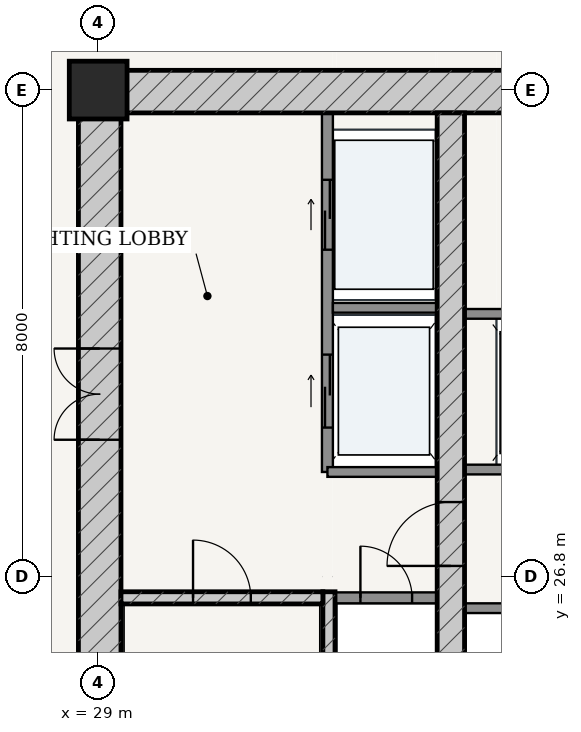
"""IFC4 building model, lengths in metres.
Left out: names, types, materials, properties, quantities, classifications, styles, units other than length and angle.
Written with IfcOpenShell. Run it as: python <this file> out.ifc"""

import sys

from ifc_helpers import new_model, si_unit, direction, frame, frame_2d, origin, origin_2d, place, context, subcontext, project, spatial, rectangle, extrude, source, transform, mapped, element, fill, save


model = new_model("IFC4")
c1 = context("Model", 3, precision=1e-05, world=origin(), true_north=direction((-0.2419218956, 0.970295726276)))
c2 = subcontext(c1, "Body", "Model", "MODEL_VIEW")
j1 = project(units=[si_unit("LENGTHUNIT", "METRE"), si_unit("PLANEANGLEUNIT", "RADIAN")], contexts=[c1])
p1 = place(None, origin())
s1 = spatial("IfcSite", under=j1, at=p1, CompositionType="ELEMENT")
p2 = place(p1, origin())
s2 = spatial("IfcBuilding", under=s1, at=p2, CompositionType="ELEMENT")
p3 = place(p2, frame((0.0, 0.0, 108.6)))
s3 = spatial("IfcBuildingStorey", under=s2, at=p3, CompositionType="ELEMENT", Elevation=108.6)
p4 = place(p3, frame((29.0, 34.8, 0.0), z_axis=(0.0, 0.0, 1.0), x_axis=(1.0, 0.0, 0.0)))
e1 = element("IfcColumn", 1, at=p4, inside=s3, PredefinedType="COLUMN", context=c2, shape_type="SweptSolid", body=[
    extrude(rectangle(XDim=0.95, YDim=0.95, at=origin_2d()), origin(), (0.0, 0.0, 1.0), 3.6),
])
p5 = place(p3, frame((28.675, 34.775, 0.0), z_axis=(0.0, 0.0, 1.0), x_axis=(1.0, 0.0, 0.0)))
e2 = element("IfcWall", 2, at=p5, inside=s3, PredefinedType="SHEAR", context=c2, shape_type="SweptSolid", body=[
    extrude(rectangle(XDim=18.65, YDim=0.7, at=frame_2d((9.325, 0.0))), origin(), (0.0, 0.0, 1.0), 3.325),
])
p6 = place(p5, frame((7.357, 0.0, 0.0)))
e3 = element("IfcOpeningElement", 3, at=p6, cuts=e2, PredefinedType="OPENING", context=c2, shape_type="SweptSolid", body=[
    extrude(rectangle(XDim=0.86, YDim=2.1, at=frame_2d((0.43, 1.05))), frame((0.0, 0.36, 0.0), z_axis=(0.0, -1.0, 0.0), x_axis=(1.0, 0.0, 0.0)), (0.0, 0.0, 1.0), 0.72),
])
p7 = place(p5, frame((10.438, 0.0, 0.0)))
e4 = element("IfcOpeningElement", 4, at=p7, cuts=e2, PredefinedType="OPENING", context=c2, shape_type="SweptSolid", body=[
    extrude(rectangle(XDim=0.85, YDim=2.1, at=frame_2d((0.425, 1.05))), frame((0.0, 0.36, 0.0), z_axis=(0.0, -1.0, 0.0), x_axis=(1.0, 0.0, 0.0)), (0.0, 0.0, 1.0), 0.72),
])
p8 = place(p3, frame((29.025, 19.175, 0.0), z_axis=(0.0, 0.0, 1.0), x_axis=(0.0, 1.0, 0.0)))
e5 = element("IfcWall", 5, at=p8, inside=s3, PredefinedType="SHEAR", context=c2, shape_type="SweptSolid", body=[
    extrude(rectangle(XDim=15.25, YDim=0.7, at=frame_2d((7.625, 0.0))), origin(), (0.0, 0.0, 1.0), 3.325),
])
p9 = place(p8, frame((9.875, 0.0, 0.0)))
e6 = element("IfcOpeningElement", 6, at=p9, cuts=e5, PredefinedType="OPENING", context=c2, shape_type="SweptSolid", body=[
    extrude(rectangle(XDim=1.5, YDim=2.2, at=frame_2d((0.75, 1.1))), frame((0.0, 0.36, 0.0), z_axis=(0.0, -1.0, 0.0), x_axis=(1.0, 0.0, 0.0)), (0.0, 0.0, 1.0), 0.72),
])
p10 = place(p3, frame((32.795, 19.175, 0.0), z_axis=(0.0, 0.0, 1.0), x_axis=(0.0, 1.0, 0.0)))
e7 = element("IfcWall", 7, at=p10, inside=s3, PredefinedType="SOLIDWALL", context=c2, shape_type="SweptSolid", body=[
    extrude(rectangle(XDim=7.375, YDim=0.2, at=frame_2d((3.688, 0.0))), origin(), (0.0, 0.0, 1.0), 3.325),
])
p11 = place(p3, frame((29.375, 26.45, 0.0), z_axis=(0.0, 0.0, 1.0), x_axis=(1.0, 0.0, 0.0)))
e8 = element("IfcWall", 8, at=p11, inside=s3, PredefinedType="SOLIDWALL", context=c2, shape_type="SweptSolid", body=[
    extrude(rectangle(XDim=3.32, YDim=0.2, at=frame_2d((1.66, 0.0))), origin(), (0.0, 0.0, 1.0), 3.325),
])
p12 = place(p11, frame((1.185, 0.0, 0.0)))
e9 = element("IfcOpeningElement", 9, at=p12, cuts=e8, PredefinedType="OPENING", context=c2, shape_type="SweptSolid", body=[
    extrude(rectangle(XDim=0.95, YDim=2.15, at=frame_2d((0.475, 1.075))), frame((0.0, 0.11, 0.0), z_axis=(0.0, -1.0, 0.0), x_axis=(1.0, 0.0, 0.0)), (0.0, 0.0, 1.0), 0.22),
])
p13 = place(p3, frame((34.8, 19.175, 0.0), z_axis=(0.0, 0.0, 1.0), x_axis=(0.0, 1.0, 0.0)))
e10 = element("IfcWall", 10, at=p13, inside=s3, PredefinedType="SHEAR", context=c2, shape_type="SweptSolid", body=[
    extrude(rectangle(XDim=15.25, YDim=0.45, at=frame_2d((7.625, 0.0))), origin(), (0.0, 0.0, 1.0), 3.325),
])
p14 = place(p13, frame((7.8, 0.0, 0.0)))
e11 = element("IfcOpeningElement", 11, at=p14, cuts=e10, PredefinedType="OPENING", context=c2, shape_type="SweptSolid", body=[
    extrude(rectangle(XDim=1.05, YDim=2.15, at=frame_2d((0.525, 1.075))), frame((0.0, 0.235, 0.0), z_axis=(0.0, -1.0, 0.0), x_axis=(1.0, 0.0, 0.0)), (0.0, 0.0, 1.0), 0.47),
])
p15 = place(p3, frame((32.9, 26.45, 0.0), z_axis=(0.0, 0.0, 1.0), x_axis=(1.0, 0.0, 0.0)))
e12 = element("IfcWall", 12, at=p15, inside=s3, PredefinedType="PARTITIONING", context=c2, shape_type="SweptSolid", body=[
    extrude(rectangle(XDim=1.675, YDim=0.18, at=frame_2d((0.837, 0.0))), origin(), (0.0, 0.0, 1.0), 3.325),
])
p16 = place(p15, frame((0.413, 0.0, 0.0)))
e13 = element("IfcOpeningElement", 13, at=p16, cuts=e12, PredefinedType="OPENING", context=c2, shape_type="SweptSolid", body=[
    extrude(rectangle(XDim=0.85, YDim=2.1, at=frame_2d((0.425, 1.05))), frame((0.0, 0.1, 0.0), z_axis=(0.0, -1.0, 0.0), x_axis=(1.0, 0.0, 0.0)), (0.0, 0.0, 1.0), 0.2),
])
p17 = place(p3, frame((32.77, 28.52, 0.0), z_axis=(0.0, 0.0, 1.0), x_axis=(0.0, 1.0, 0.0)))
e14 = element("IfcWall", 14, at=p17, inside=s3, PredefinedType="PARTITIONING", context=c2, shape_type="SweptSolid", body=[
    extrude(rectangle(XDim=5.905, YDim=0.18, at=frame_2d((2.953, 0.0))), origin(), (0.0, 0.0, 1.0), 3.325),
])
p18 = place(p17, frame((3.655, 0.0, 0.0)))
e15 = element("IfcOpeningElement", 15, at=p18, cuts=e14, PredefinedType="OPENING", context=c2, shape_type="SweptSolid", body=[
    extrude(rectangle(XDim=1.15, YDim=2.2, at=frame_2d((0.575, 1.1))), frame((0.0, 0.1, 0.0), z_axis=(0.0, -1.0, 0.0), x_axis=(1.0, 0.0, 0.0)), (0.0, 0.0, 1.0), 0.2),
])
p19 = place(p17, frame((0.73, 0.0, 0.0)))
e16 = element("IfcOpeningElement", 16, at=p19, cuts=e14, PredefinedType="OPENING", context=c2, shape_type="SweptSolid", body=[
    extrude(rectangle(XDim=1.2, YDim=2.25, at=frame_2d((0.6, 1.125))), frame((0.0, 0.1, 0.0), z_axis=(0.0, -1.0, 0.0), x_axis=(1.0, 0.0, 0.0)), (0.0, 0.0, 1.0), 0.2),
])
p20 = place(p3, frame((32.86, 31.22, 0.0), z_axis=(0.0, 0.0, 1.0), x_axis=(1.0, 0.0, 0.0)))
e17 = element("IfcWall", 17, at=p20, inside=s3, PredefinedType="PARTITIONING", context=c2, shape_type="SweptSolid", body=[
    extrude(rectangle(XDim=1.715, YDim=0.16, at=frame_2d((0.857, 0.0))), origin(), (0.0, 0.0, 1.0), 3.325),
])
p21 = place(p3, frame((32.77, 28.52, 0.0), z_axis=(0.0, 0.0, 1.0), x_axis=(1.0, 0.0, 0.0)))
e18 = element("IfcWall", 18, at=p21, inside=s3, PredefinedType="PARTITIONING", context=c2, shape_type="SweptSolid", body=[
    extrude(rectangle(XDim=1.805, YDim=0.16, at=frame_2d((0.902, 0.0))), origin(), (0.0, 0.0, 1.0), 3.325),
])
p22 = place(p3, frame((35.025, 28.56, 0.0), z_axis=(0.0, 0.0, 1.0), x_axis=(1.0, 0.0, 0.0)))
e19 = element("IfcWall", 19, at=p22, inside=s3, PredefinedType="PARTITIONING", context=c2, shape_type="SweptSolid", body=[
    extrude(rectangle(XDim=5.95, YDim=0.16, at=frame_2d((2.975, 0.0))), origin(), (0.0, 0.0, 1.0), 3.325),
])
p23 = place(p22, frame((0.76, 0.0, 0.0)))
e20 = element("IfcOpeningElement", 20, at=p23, cuts=e19, PredefinedType="OPENING", context=c2, shape_type="SweptSolid", body=[
    extrude(rectangle(XDim=1.1, YDim=2.2, at=frame_2d((0.55, 1.1))), frame((0.0, 0.09, 0.0), z_axis=(0.0, -1.0, 0.0), x_axis=(1.0, 0.0, 0.0)), (0.0, 0.0, 1.0), 0.18),
])
p24 = place(p22, frame((2.425, 0.0, 0.0)))
e21 = element("IfcOpeningElement", 21, at=p24, cuts=e19, PredefinedType="OPENING", context=c2, shape_type="SweptSolid", body=[
    extrude(rectangle(XDim=1.1, YDim=2.2, at=frame_2d((0.55, 1.1))), frame((0.0, 0.09, 0.0), z_axis=(0.0, -1.0, 0.0), x_axis=(1.0, 0.0, 0.0)), (0.0, 0.0, 1.0), 0.18),
])
p25 = place(p22, frame((4.09, 0.0, 0.0)))
e22 = element("IfcOpeningElement", 22, at=p25, cuts=e19, PredefinedType="OPENING", context=c2, shape_type="SweptSolid", body=[
    extrude(rectangle(XDim=1.1, YDim=2.2, at=frame_2d((0.55, 1.1))), frame((0.0, 0.09, 0.0), z_axis=(0.0, -1.0, 0.0), x_axis=(1.0, 0.0, 0.0)), (0.0, 0.0, 1.0), 0.18),
])
for number, where, z_axis, x_axis in (
    (23, (35.025, 31.12, 0.0), (0.0, 0.0, 1.0), (1.0, 0.0, 0.0)),
    (24, (35.025, 26.28, 0.0), (0.0, 0.0, 1.0), (1.0, 0.0, 0.0)),
):
    element("IfcWall", number, at=place(p3, frame(where, z_axis=z_axis, x_axis=x_axis)), inside=s3, PredefinedType="PARTITIONING", context=c2, shape_type="SweptSolid", body=[
        extrude(rectangle(XDim=5.95, YDim=0.16, at=frame_2d((2.975, 0.0))), origin(), (0.0, 0.0, 1.0), 3.325),
    ])
m1 = source(origin(), c2, "Body", "SweptSolid", [
    extrude(rectangle(XDim=1.5, YDim=2.2, at=frame_2d((0.75, 1.1))), frame((0.0, 0.025, 0.0), z_axis=(0.0, -1.0, 0.0), x_axis=(1.0, 0.0, 0.0)), (0.0, 0.0, 1.0), 0.05),
])
p26 = place(p9, origin())
e25 = element("IfcDoor", 25, at=p26, inside=s3, OperationType="DOUBLE_DOOR_SINGLE_SWING", PredefinedType="DOOR", context=c2, shape_type="MappedRepresentation", body=[
    mapped(m1, transform((0.0, 0.0, 0.0), scale=1.0)),
])
fill(e6, e25)
m2 = source(origin(), c2, "Body", "SweptSolid", [
    extrude(rectangle(XDim=1.05, YDim=2.15, at=frame_2d((0.525, 1.075))), frame((0.0, 0.025, 0.0), z_axis=(0.0, -1.0, 0.0), x_axis=(1.0, 0.0, 0.0)), (0.0, 0.0, 1.0), 0.05),
])
p27 = place(p14, origin())
e26 = element("IfcDoor", 26, at=p27, inside=s3, OperationType="SINGLE_SWING_LEFT", PredefinedType="DOOR", context=c2, shape_type="MappedRepresentation", body=[
    mapped(m2, transform((0.0, 0.0, 0.0), scale=1.0)),
])
fill(e11, e26)
m3 = source(origin(), c2, "Body", "SweptSolid", [
    extrude(rectangle(XDim=0.95, YDim=2.15, at=frame_2d((0.475, 1.075))), frame((0.0, 0.025, 0.0), z_axis=(0.0, -1.0, 0.0), x_axis=(1.0, 0.0, 0.0)), (0.0, 0.0, 1.0), 0.05),
])
p28 = place(p12, origin())
e27 = element("IfcDoor", 27, at=p28, inside=s3, OperationType="SINGLE_SWING_LEFT", PredefinedType="DOOR", context=c2, shape_type="MappedRepresentation", body=[
    mapped(m3, transform((0.0, 0.0, 0.0), scale=1.0)),
])
fill(e9, e27)
m4 = source(origin(), c2, "Body", "SweptSolid", [
    extrude(rectangle(XDim=0.85, YDim=2.1, at=frame_2d((0.425, 1.05))), frame((0.0, 0.025, 0.0), z_axis=(0.0, -1.0, 0.0), x_axis=(1.0, 0.0, 0.0)), (0.0, 0.0, 1.0), 0.05),
])
p29 = place(p16, origin())
e28 = element("IfcDoor", 28, at=p29, inside=s3, OperationType="SINGLE_SWING_LEFT", PredefinedType="DOOR", context=c2, shape_type="MappedRepresentation", body=[
    mapped(m4, transform((0.0, 0.0, 0.0), scale=1.0)),
])
fill(e13, e28)
m5 = source(origin(), c2, "Body", "SweptSolid", [
    extrude(rectangle(XDim=1.15, YDim=2.2, at=frame_2d((0.575, 1.1))), frame((0.0, 0.025, 0.0), z_axis=(0.0, -1.0, 0.0), x_axis=(1.0, 0.0, 0.0)), (0.0, 0.0, 1.0), 0.05),
])
p30 = place(p18, origin())
e29 = element("IfcDoor", 29, at=p30, inside=s3, OperationType="DOUBLE_DOOR_SLIDING", PredefinedType="DOOR", context=c2, shape_type="MappedRepresentation", body=[
    mapped(m5, transform((0.0, 0.0, 0.0), scale=1.0)),
])
fill(e15, e29)
m6 = source(origin(), c2, "Body", "SweptSolid", [
    extrude(rectangle(XDim=1.2, YDim=2.25, at=frame_2d((0.6, 1.125))), frame((0.0, 0.025, 0.0), z_axis=(0.0, -1.0, 0.0), x_axis=(1.0, 0.0, 0.0)), (0.0, 0.0, 1.0), 0.05),
])
p31 = place(p19, origin())
e30 = element("IfcDoor", 30, at=p31, inside=s3, OperationType="DOUBLE_DOOR_SLIDING", PredefinedType="DOOR", context=c2, shape_type="MappedRepresentation", body=[
    mapped(m6, transform((0.0, 0.0, 0.0), scale=1.0)),
])
fill(e16, e30)
save(model, sys.argv[1])
